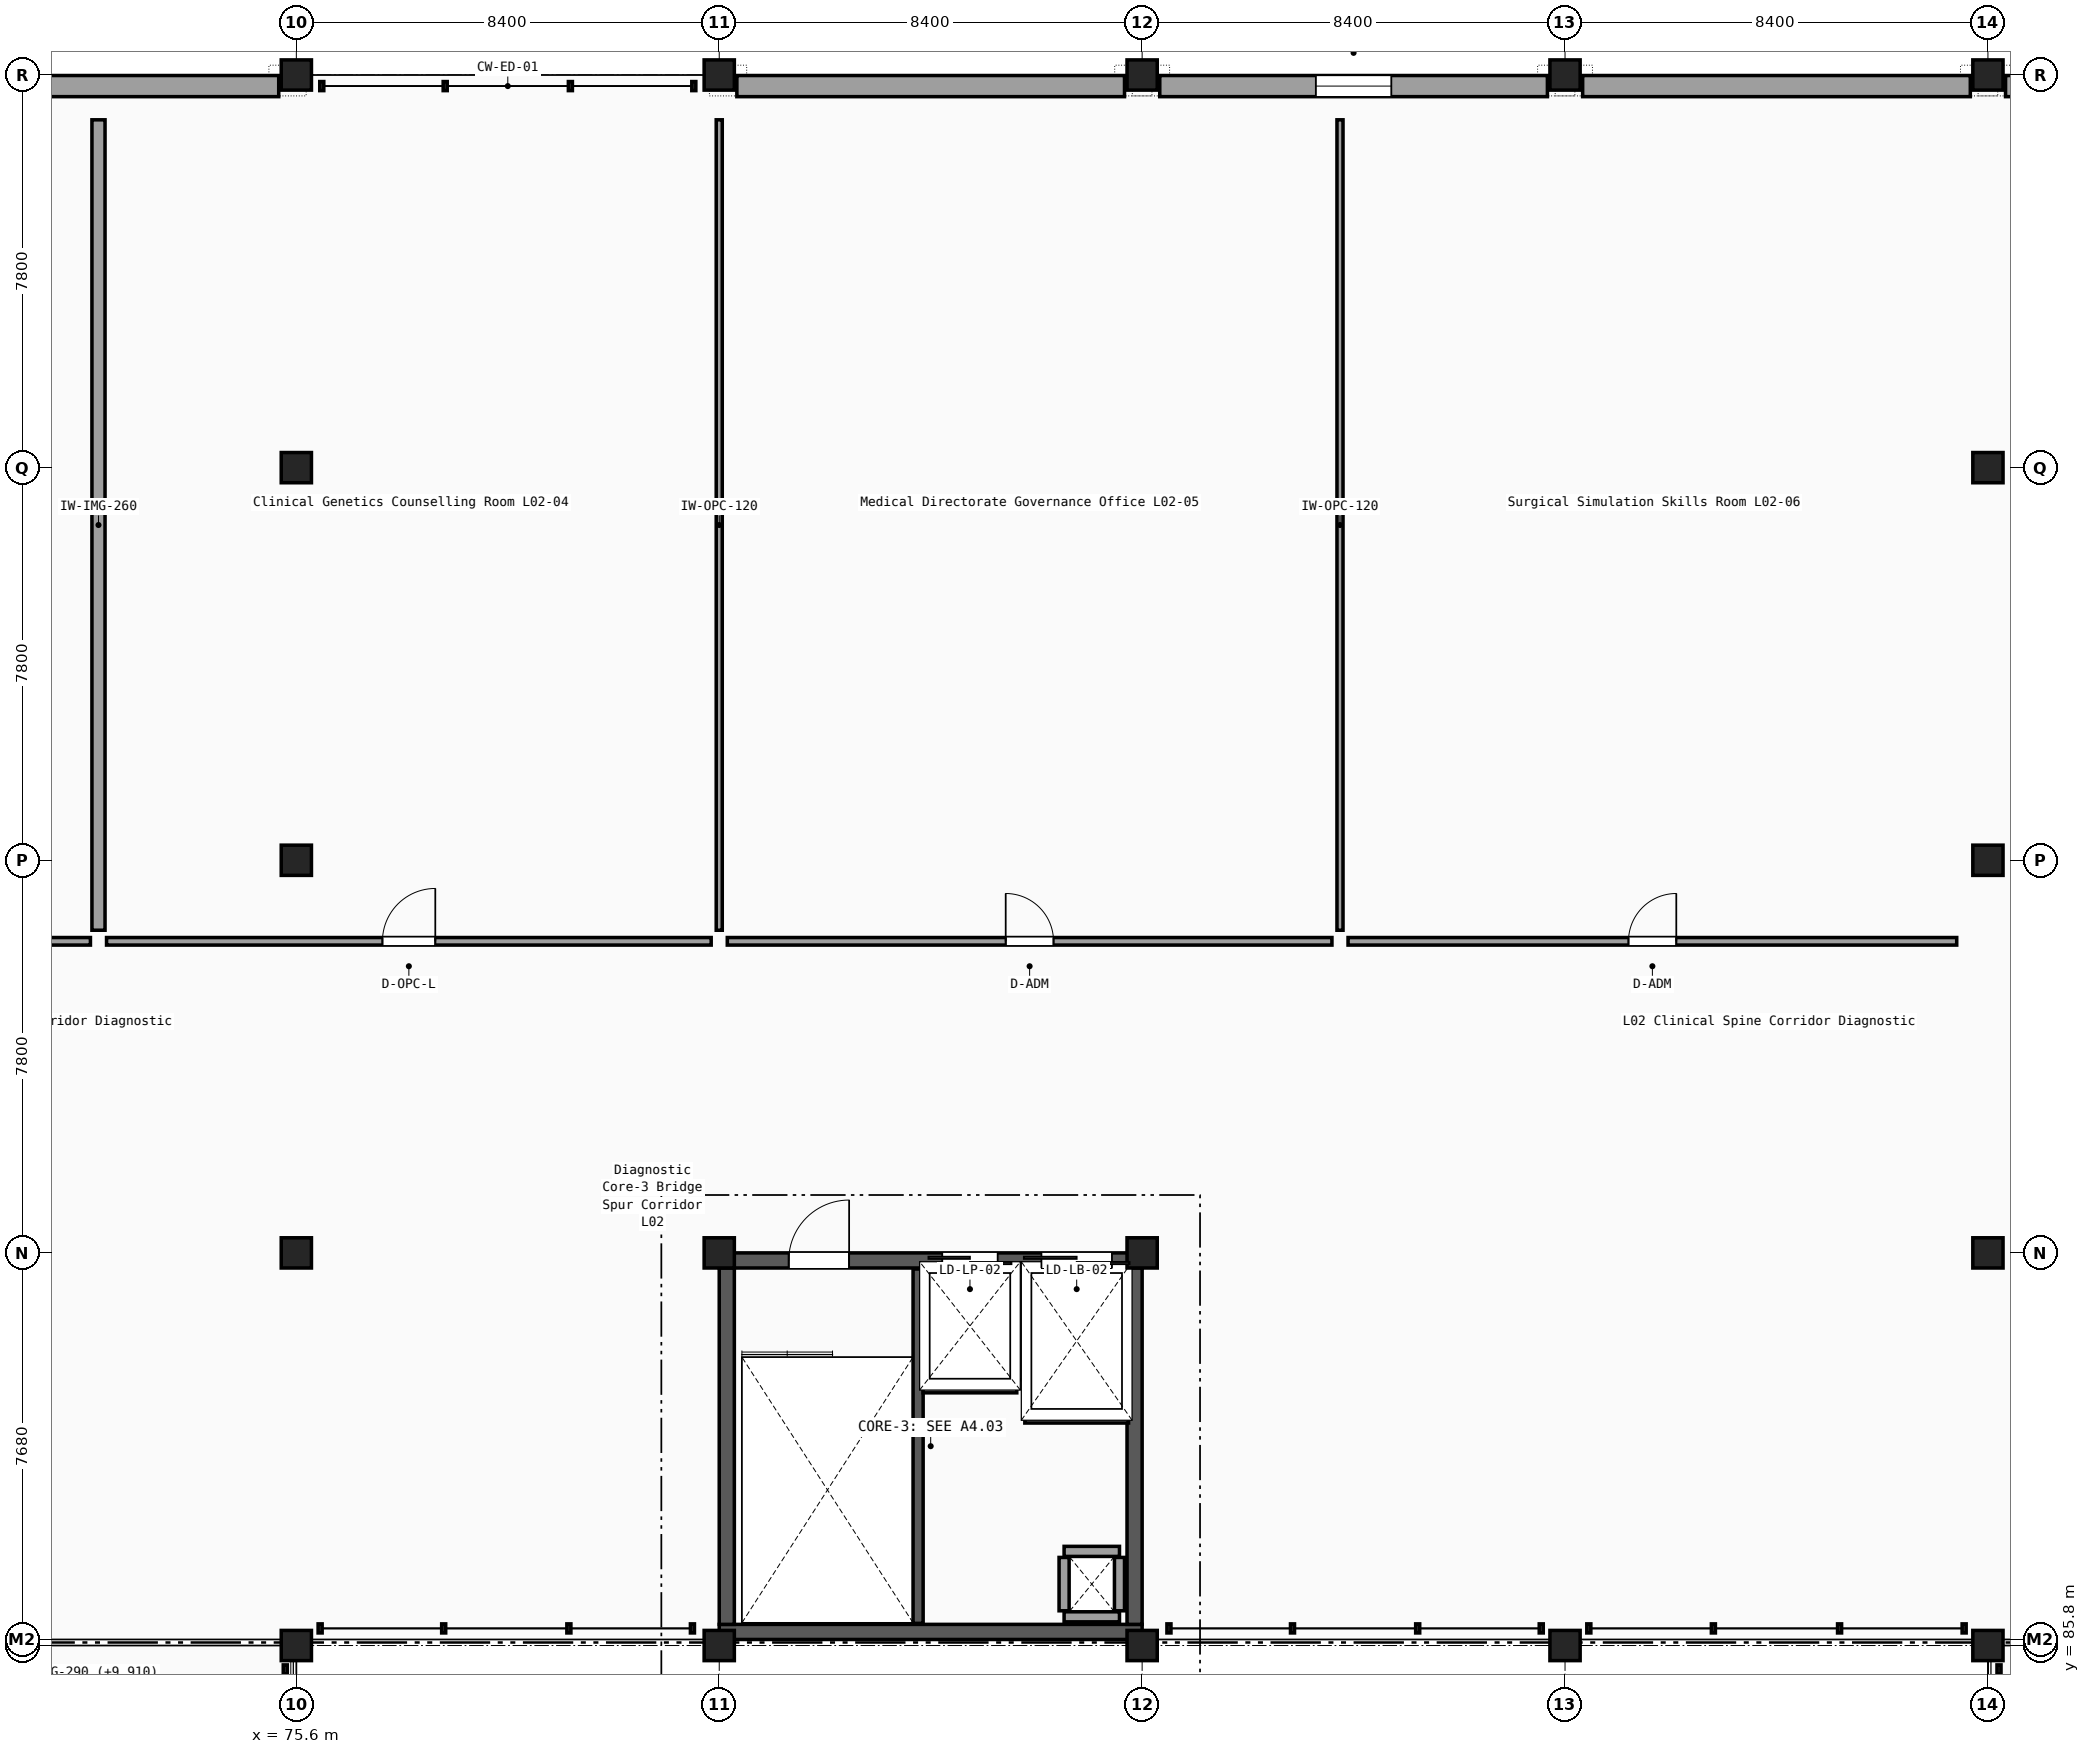
"""IFC4 building model, lengths in metres.
Left out: names, types, materials, properties, quantities, classifications, styles, units other than length and angle.
Written with IfcOpenShell. Run it as: python <this file> out.ifc"""

import sys

from ifc_helpers import new_model, si_unit, direction, frame, frame_2d, origin, origin_2d, place, context, subcontext, project, spatial, rectangle, extrude, element, fill, save


model = new_model("IFC4")
c1 = context("Model", 3, precision=1e-05, world=origin(), true_north=direction((0.0, 1.0)))
c2 = subcontext(c1, "Body", "Model", "MODEL_VIEW")
j1 = project(units=[si_unit("LENGTHUNIT", "METRE"), si_unit("PLANEANGLEUNIT", "RADIAN")], contexts=[c1])
p1 = place(None, origin())
s1 = spatial("IfcSite", under=j1, at=p1, CompositionType="ELEMENT")
p2 = place(p1, origin())
s2 = spatial("IfcBuilding", under=s1, at=p2, CompositionType="ELEMENT")
p3 = place(p2, frame((0.0, 0.0, 10.2)))
s3 = spatial("IfcBuildingStorey", under=s2, at=p3, CompositionType="ELEMENT", Elevation=10.2)
for number, where, z_axis, x_axis in (
    (1, (75.6, 85.8, 0.0), (0.0, 0.0, 1.0), (1.0, 0.0, 0.0)),
    (2, (75.6, 93.6, 0.0), (0.0, 0.0, 1.0), (1.0, 0.0, 0.0)),
    (3, (75.6, 101.4, 0.0), (0.0, 0.0, 1.0), (1.0, 0.0, 0.0)),
    (4, (75.6, 109.2, 0.0), (0.0, 0.0, 1.0), (1.0, 0.0, 0.0)),
    (5, (75.6, 117.0, 0.0), (0.0, 0.0, 1.0), (1.0, 0.0, 0.0)),
    (6, (84.0, 85.8, 0.0), (0.0, 0.0, 1.0), (1.0, 0.0, 0.0)),
    (7, (84.0, 93.6, 0.0), (0.0, 0.0, 1.0), (1.0, 0.0, 0.0)),
    (8, (84.0, 117.0, 0.0), (0.0, 0.0, 1.0), (1.0, 0.0, 0.0)),
    (9, (92.4, 85.8, 0.0), (0.0, 0.0, 1.0), (1.0, 0.0, 0.0)),
    (10, (92.4, 93.6, 0.0), (0.0, 0.0, 1.0), (1.0, 0.0, 0.0)),
    (11, (92.4, 117.0, 0.0), (0.0, 0.0, 1.0), (1.0, 0.0, 0.0)),
    (12, (100.8, 85.8, 0.0), (0.0, 0.0, 1.0), (1.0, 0.0, 0.0)),
    (13, (100.8, 117.0, 0.0), (0.0, 0.0, 1.0), (1.0, 0.0, 0.0)),
    (14, (109.2, 85.8, 0.0), (0.0, 0.0, 1.0), (1.0, 0.0, 0.0)),
    (15, (109.2, 93.6, 0.0), (0.0, 0.0, 1.0), (1.0, 0.0, 0.0)),
    (16, (109.2, 101.4, 0.0), (0.0, 0.0, 1.0), (1.0, 0.0, 0.0)),
    (17, (109.2, 109.2, 0.0), (0.0, 0.0, 1.0), (1.0, 0.0, 0.0)),
    (18, (109.2, 117.0, 0.0), (0.0, 0.0, 1.0), (1.0, 0.0, 0.0)),
):
    element("IfcColumn", number, at=place(p3, frame(where, z_axis=z_axis, x_axis=x_axis)), inside=s3, PredefinedType="COLUMN", context=c2, shape_type="SweptSolid", body=[
        extrude(rectangle(XDim=0.6, YDim=0.6, at=origin_2d()), origin(), (0.0, 0.0, 1.0), 4.65),
    ])
p4 = place(p3, frame((67.55, 116.78, 0.0), z_axis=(0.0, 0.0, 1.0), x_axis=(1.0, 0.0, 0.0)))
e19 = element("IfcWall", 19, at=p4, inside=s3, PredefinedType="SOLIDWALL", context=c2, shape_type="SweptSolid", body=[
    extrude(rectangle(XDim=7.7, YDim=0.42, at=frame_2d((3.85, 0.0))), origin(), (0.0, 0.0, 1.0), 4.04),
])
p5 = place(p3, frame((84.35, 116.78, 0.0), z_axis=(0.0, 0.0, 1.0), x_axis=(1.0, 0.0, 0.0)))
e20 = element("IfcWall", 20, at=p5, inside=s3, PredefinedType="SOLIDWALL", context=c2, shape_type="SweptSolid", body=[
    extrude(rectangle(XDim=7.7, YDim=0.42, at=frame_2d((3.85, 0.0))), origin(), (0.0, 0.0, 1.0), 4.37),
])
p6 = place(p3, frame((92.75, 116.78, 0.0), z_axis=(0.0, 0.0, 1.0), x_axis=(1.0, 0.0, 0.0)))
e21 = element("IfcWall", 21, at=p6, inside=s3, PredefinedType="SOLIDWALL", context=c2, shape_type="SweptSolid", body=[
    extrude(rectangle(XDim=7.7, YDim=0.42, at=frame_2d((3.85, 0.0))), origin(), (0.0, 0.0, 1.0), 4.37),
])
p7 = place(p6, frame((3.1, 0.0, 0.95)))
e22 = element("IfcOpeningElement", 22, at=p7, cuts=e21, PredefinedType="OPENING", context=c2, shape_type="SweptSolid", body=[
    extrude(rectangle(XDim=1.5, YDim=1.5, at=frame_2d((0.75, 0.75))), frame((0.0, 0.22, 0.0), z_axis=(0.0, -1.0, 0.0), x_axis=(1.0, 0.0, 0.0)), (0.0, 0.0, 1.0), 0.44),
])
p8 = place(p3, frame((101.15, 116.78, 0.0), z_axis=(0.0, 0.0, 1.0), x_axis=(1.0, 0.0, 0.0)))
e23 = element("IfcWall", 23, at=p8, inside=s3, PredefinedType="SOLIDWALL", context=c2, shape_type="SweptSolid", body=[
    extrude(rectangle(XDim=7.7, YDim=0.42, at=frame_2d((3.85, 0.0))), origin(), (0.0, 0.0, 1.0), 4.04),
])
p9 = place(p3, frame((109.55, 116.78, 0.0), z_axis=(0.0, 0.0, 1.0), x_axis=(1.0, 0.0, 0.0)))
e24 = element("IfcWall", 24, at=p9, inside=s3, PredefinedType="SOLIDWALL", context=c2, shape_type="SweptSolid", body=[
    extrude(rectangle(XDim=7.7, YDim=0.42, at=frame_2d((3.85, 0.0))), origin(), (0.0, 0.0, 1.0), 4.04),
])
p10 = place(p3, frame((84.0, 86.07, 0.0), z_axis=(0.0, 0.0, 1.0), x_axis=(1.0, 0.0, 0.0)))
e25 = element("IfcWall", 25, at=p10, inside=s3, PredefinedType="SHEAR", context=c2, shape_type="SweptSolid", body=[
    extrude(rectangle(XDim=8.4, YDim=0.3, at=frame_2d((4.2, 0.0))), origin(), (0.0, 0.0, 1.0), 4.4),
])
p11 = place(p3, frame((84.0, 93.45, 0.0), z_axis=(0.0, 0.0, 1.0), x_axis=(1.0, 0.0, 0.0)))
e26 = element("IfcWall", 26, at=p11, inside=s3, PredefinedType="SHEAR", context=c2, shape_type="SweptSolid", body=[
    extrude(rectangle(XDim=8.4, YDim=0.3, at=frame_2d((4.2, 0.0))), origin(), (0.0, 0.0, 1.0), 4.4),
])
p12 = place(p11, frame((1.38, 0.0, 0.0)))
e27 = element("IfcOpeningElement", 27, at=p12, cuts=e26, PredefinedType="OPENING", context=c2, shape_type="SweptSolid", body=[
    extrude(rectangle(XDim=1.2, YDim=2.15, at=frame_2d((0.6, 1.075))), frame((0.0, 0.16, 0.0), z_axis=(0.0, -1.0, 0.0), x_axis=(1.0, 0.0, 0.0)), (0.0, 0.0, 1.0), 0.32),
])
p13 = place(p11, frame((4.43, 0.0, 0.0)))
e28 = element("IfcOpeningElement", 28, at=p13, cuts=e26, PredefinedType="OPENING", context=c2, shape_type="SweptSolid", body=[
    extrude(rectangle(XDim=1.1, YDim=2.15, at=frame_2d((0.55, 1.075))), frame((0.0, 0.16, 0.0), z_axis=(0.0, -1.0, 0.0), x_axis=(1.0, 0.0, 0.0)), (0.0, 0.0, 1.0), 0.32),
])
p14 = place(p11, frame((6.4, 0.0, 0.0)))
e29 = element("IfcOpeningElement", 29, at=p14, cuts=e26, PredefinedType="OPENING", context=c2, shape_type="SweptSolid", body=[
    extrude(rectangle(XDim=1.4, YDim=2.2, at=frame_2d((0.7, 1.1))), frame((0.0, 0.16, 0.0), z_axis=(0.0, -1.0, 0.0), x_axis=(1.0, 0.0, 0.0)), (0.0, 0.0, 1.0), 0.32),
])
for number, where, z_axis, x_axis in (
    (30, (84.15, 86.22, 0.0), (0.0, 0.0, 1.0), (0.0, 1.0, 0.0)),
    (31, (92.25, 86.22, 0.0), (0.0, 0.0, 1.0), (0.0, 1.0, 0.0)),
):
    element("IfcWall", number, at=place(p3, frame(where, z_axis=z_axis, x_axis=x_axis)), inside=s3, PredefinedType="SHEAR", context=c2, shape_type="SweptSolid", body=[
        extrude(rectangle(XDim=7.08, YDim=0.3, at=frame_2d((3.54, 0.0))), origin(), (0.0, 0.0, 1.0), 4.4),
    ])
p15 = place(p3, frame((87.95, 86.24, 0.0), z_axis=(0.0, 0.0, 1.0), x_axis=(0.0, 1.0, 0.0)))
e32 = element("IfcWall", 32, at=p15, inside=s3, PredefinedType="SHEAR", context=c2, shape_type="SweptSolid", body=[
    extrude(rectangle(XDim=7.04, YDim=0.2, at=frame_2d((3.52, 0.0))), origin(), (0.0, 0.0, 1.0), 4.4),
])
for number, where, z_axis, x_axis in (
    (33, (90.85, 86.37, 0.0), (0.0, 0.0, 1.0), (1.0, 0.0, 0.0)),
    (34, (90.85, 87.67, 0.0), (0.0, 0.0, 1.0), (1.0, 0.0, 0.0)),
):
    element("IfcWall", number, at=place(p3, frame(where, z_axis=z_axis, x_axis=x_axis)), inside=s3, PredefinedType="PARTITIONING", context=c2, shape_type="SweptSolid", body=[
        extrude(rectangle(XDim=1.1, YDim=0.2, at=frame_2d((0.55, 0.0))), origin(), (0.0, 0.0, 1.0), 4.04),
    ])
for number, where, z_axis, x_axis in (
    (35, (90.85, 86.49, 0.0), (0.0, 0.0, 1.0), (0.0, 1.0, 0.0)),
    (36, (91.95, 86.49, 0.0), (0.0, 0.0, 1.0), (0.0, 1.0, 0.0)),
):
    element("IfcWall", number, at=place(p3, frame(where, z_axis=z_axis, x_axis=x_axis)), inside=s3, PredefinedType="PARTITIONING", context=c2, shape_type="SweptSolid", body=[
        extrude(rectangle(XDim=1.06, YDim=0.2, at=frame_2d((0.53, 0.0))), origin(), (0.0, 0.0, 1.0), 4.04),
    ])
p16 = place(p3, frame((89.94, 91.08, 0.0), z_axis=(0.0, 0.0, 1.0), x_axis=(0.0, 1.0, 0.0)))
e37 = element("IfcWall", 37, at=p16, inside=s3, PredefinedType="PARTITIONING", context=c2, shape_type="SweptSolid", body=[
    extrude(rectangle(XDim=2.14, YDim=0.2, at=frame_2d((1.07, 0.0))), origin(), (0.0, 0.0, 1.0), 4.04),
])
p17 = place(p3, frame((88.05, 90.92, 0.0), z_axis=(0.0, 0.0, 1.0), x_axis=(1.0, 0.0, 0.0)))
e38 = element("IfcWall", 38, at=p17, inside=s3, PredefinedType="PARTITIONING", context=c2, shape_type="SweptSolid", body=[
    extrude(rectangle(XDim=1.86, YDim=0.2, at=frame_2d((0.93, 0.0))), origin(), (0.0, 0.0, 1.0), 4.04),
])
p18 = place(p3, frame((90.07, 90.32, 0.0), z_axis=(0.0, 0.0, 1.0), x_axis=(1.0, 0.0, 0.0)))
e39 = element("IfcWall", 39, at=p18, inside=s3, PredefinedType="PARTITIONING", context=c2, shape_type="SweptSolid", body=[
    extrude(rectangle(XDim=2.06, YDim=0.2, at=frame_2d((1.03, 0.0))), origin(), (0.0, 0.0, 1.0), 4.04),
])
p19 = place(p3, frame((59.42, 99.79, 0.0), z_axis=(0.0, 0.0, 1.0), x_axis=(1.0, 0.0, 0.0)))
e40 = element("IfcWall", 40, at=p19, inside=s3, PredefinedType="PARTITIONING", context=c2, shape_type="SweptSolid", body=[
    extrude(rectangle(XDim=12.09, YDim=0.15, at=frame_2d((6.045, 0.0))), origin(), (0.0, 0.0, 1.0), 4.04),
])
p20 = place(p19, frame((5.27, 0.0, 0.0)))
e41 = element("IfcOpeningElement", 41, at=p20, cuts=e40, PredefinedType="OPENING", context=c2, shape_type="SweptSolid", body=[
    extrude(rectangle(XDim=1.55, YDim=2.25, at=frame_2d((0.775, 1.125))), frame((0.0, 0.085, 0.0), z_axis=(0.0, -1.0, 0.0), x_axis=(1.0, 0.0, 0.0)), (0.0, 0.0, 1.0), 0.17),
])
p21 = place(p3, frame((71.67, 100.01, 0.0), z_axis=(0.0, 0.0, 1.0), x_axis=(0.0, 1.0, 0.0)))
e42 = element("IfcWall", 42, at=p21, inside=s3, PredefinedType="PARTITIONING", context=c2, shape_type="SweptSolid", body=[
    extrude(rectangle(XDim=16.1, YDim=0.26, at=frame_2d((8.05, 0.0))), origin(), (0.0, 0.0, 1.0), 4.04),
])
p22 = place(p3, frame((71.83, 99.79, 0.0), z_axis=(0.0, 0.0, 1.0), x_axis=(1.0, 0.0, 0.0)))
e43 = element("IfcWall", 43, at=p22, inside=s3, PredefinedType="PARTITIONING", context=c2, shape_type="SweptSolid", body=[
    extrude(rectangle(XDim=12.01, YDim=0.15, at=frame_2d((6.005, 0.0))), origin(), (0.0, 0.0, 1.0), 4.04),
])
p23 = place(p22, frame((5.48, 0.0, 0.0)))
e44 = element("IfcOpeningElement", 44, at=p23, cuts=e43, PredefinedType="OPENING", context=c2, shape_type="SweptSolid", body=[
    extrude(rectangle(XDim=1.05, YDim=2.15, at=frame_2d((0.525, 1.075))), frame((0.0, 0.085, 0.0), z_axis=(0.0, -1.0, 0.0), x_axis=(1.0, 0.0, 0.0)), (0.0, 0.0, 1.0), 0.17),
])
p24 = place(p3, frame((84.0, 100.01, 0.0), z_axis=(0.0, 0.0, 1.0), x_axis=(0.0, 1.0, 0.0)))
e45 = element("IfcWall", 45, at=p24, inside=s3, PredefinedType="PARTITIONING", context=c2, shape_type="SweptSolid", body=[
    extrude(rectangle(XDim=16.1, YDim=0.12, at=frame_2d((8.05, 0.0))), origin(), (0.0, 0.0, 1.0), 4.04),
])
p25 = place(p3, frame((84.16, 99.79, 0.0), z_axis=(0.0, 0.0, 1.0), x_axis=(1.0, 0.0, 0.0)))
e46 = element("IfcWall", 46, at=p25, inside=s3, PredefinedType="PARTITIONING", context=c2, shape_type="SweptSolid", body=[
    extrude(rectangle(XDim=12.01, YDim=0.15, at=frame_2d((6.005, 0.0))), origin(), (0.0, 0.0, 1.0), 4.37),
])
p26 = place(p25, frame((5.53, 0.0, 0.0)))
e47 = element("IfcOpeningElement", 47, at=p26, cuts=e46, PredefinedType="OPENING", context=c2, shape_type="SweptSolid", body=[
    extrude(rectangle(XDim=0.95, YDim=2.1, at=frame_2d((0.475, 1.05))), frame((0.0, 0.085, 0.0), z_axis=(0.0, -1.0, 0.0), x_axis=(1.0, 0.0, 0.0)), (0.0, 0.0, 1.0), 0.17),
])
p27 = place(p3, frame((96.33, 100.01, 0.0), z_axis=(0.0, 0.0, 1.0), x_axis=(0.0, 1.0, 0.0)))
e48 = element("IfcWall", 48, at=p27, inside=s3, PredefinedType="PARTITIONING", context=c2, shape_type="SweptSolid", body=[
    extrude(rectangle(XDim=16.1, YDim=0.12, at=frame_2d((8.05, 0.0))), origin(), (0.0, 0.0, 1.0), 4.04),
])
p28 = place(p3, frame((96.49, 99.79, 0.0), z_axis=(0.0, 0.0, 1.0), x_axis=(1.0, 0.0, 0.0)))
e49 = element("IfcWall", 49, at=p28, inside=s3, PredefinedType="PARTITIONING", context=c2, shape_type="SweptSolid", body=[
    extrude(rectangle(XDim=12.09, YDim=0.15, at=frame_2d((6.045, 0.0))), origin(), (0.0, 0.0, 1.0), 4.37),
])
p29 = place(p28, frame((5.57, 0.0, 0.0)))
e50 = element("IfcOpeningElement", 50, at=p29, cuts=e49, PredefinedType="OPENING", context=c2, shape_type="SweptSolid", body=[
    extrude(rectangle(XDim=0.95, YDim=2.1, at=frame_2d((0.475, 1.05))), frame((0.0, 0.085, 0.0), z_axis=(0.0, -1.0, 0.0), x_axis=(1.0, 0.0, 0.0)), (0.0, 0.0, 1.0), 0.17),
])
p30 = place(p7, origin())
e51 = element("IfcWindow", 51, at=p30, inside=s3, PartitioningType="SINGLE_PANEL", PredefinedType="WINDOW", context=c2, shape_type="SweptSolid", body=[
    extrude(rectangle(XDim=1.5, YDim=1.5, at=frame_2d((0.75, 0.75))), frame((0.0, 0.03, 0.0), z_axis=(0.0, -1.0, 0.0), x_axis=(1.0, 0.0, 0.0)), (0.0, 0.0, 1.0), 0.06),
])
fill(e22, e51)
p31 = place(p12, origin())
e52 = element("IfcDoor", 52, at=p31, inside=s3, OperationType="SINGLE_SWING_RIGHT", PredefinedType="DOOR", context=c2, shape_type="SweptSolid", body=[
    extrude(rectangle(XDim=1.2, YDim=2.15, at=frame_2d((0.6, 1.075))), frame((0.0, 0.025, 0.0), z_axis=(0.0, -1.0, 0.0), x_axis=(1.0, 0.0, 0.0)), (0.0, 0.0, 1.0), 0.05),
])
fill(e27, e52)
p32 = place(p13, origin())
e53 = element("IfcDoor", 53, at=p32, inside=s3, OperationType="DOUBLE_DOOR_SLIDING", PredefinedType="DOOR", context=c2, shape_type="SweptSolid", body=[
    extrude(rectangle(XDim=1.1, YDim=2.15, at=frame_2d((0.55, 1.075))), frame((0.0, 0.025, 0.0), z_axis=(0.0, -1.0, 0.0), x_axis=(1.0, 0.0, 0.0)), (0.0, 0.0, 1.0), 0.05),
])
fill(e28, e53)
p33 = place(p14, origin())
e54 = element("IfcDoor", 54, at=p33, inside=s3, OperationType="DOUBLE_DOOR_SLIDING", PredefinedType="DOOR", context=c2, shape_type="SweptSolid", body=[
    extrude(rectangle(XDim=1.4, YDim=2.2, at=frame_2d((0.7, 1.1))), frame((0.0, 0.025, 0.0), z_axis=(0.0, -1.0, 0.0), x_axis=(1.0, 0.0, 0.0)), (0.0, 0.0, 1.0), 0.05),
])
fill(e29, e54)
p34 = place(p23, origin())
e55 = element("IfcDoor", 55, at=p34, inside=s3, OperationType="SINGLE_SWING_RIGHT", PredefinedType="DOOR", context=c2, shape_type="SweptSolid", body=[
    extrude(rectangle(XDim=1.05, YDim=2.15, at=frame_2d((0.525, 1.075))), frame((0.0, 0.025, 0.0), z_axis=(0.0, -1.0, 0.0), x_axis=(1.0, 0.0, 0.0)), (0.0, 0.0, 1.0), 0.05),
])
fill(e44, e55)
p35 = place(p26, origin())
e56 = element("IfcDoor", 56, at=p35, inside=s3, OperationType="SINGLE_SWING_LEFT", PredefinedType="DOOR", context=c2, shape_type="SweptSolid", body=[
    extrude(rectangle(XDim=0.95, YDim=2.1, at=frame_2d((0.475, 1.05))), frame((0.0, 0.025, 0.0), z_axis=(0.0, -1.0, 0.0), x_axis=(1.0, 0.0, 0.0)), (0.0, 0.0, 1.0), 0.05),
])
fill(e47, e56)
p36 = place(p29, origin())
e57 = element("IfcDoor", 57, at=p36, inside=s3, OperationType="SINGLE_SWING_RIGHT", PredefinedType="DOOR", context=c2, shape_type="SweptSolid", body=[
    extrude(rectangle(XDim=0.95, YDim=2.1, at=frame_2d((0.475, 1.05))), frame((0.0, 0.025, 0.0), z_axis=(0.0, -1.0, 0.0), x_axis=(1.0, 0.0, 0.0)), (0.0, 0.0, 1.0), 0.05),
])
fill(e50, e57)
save(model, sys.argv[1])
